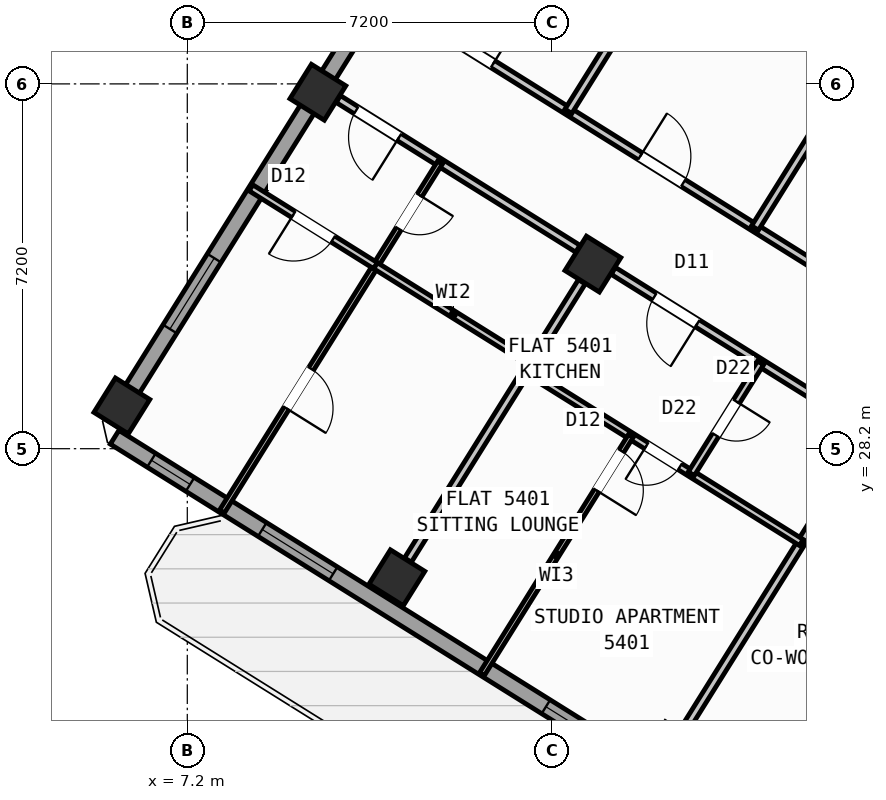
"""IFC4 building model, lengths in metres.
Left out: names, types, materials, properties, quantities, classifications, styles, units other than length and angle.
Written with IfcOpenShell. Run it as: python <this file> out.ifc"""

import sys

from ifc_helpers import new_model, si_unit, direction, frame, frame_2d, origin, origin_2d, place, context, subcontext, project, spatial, rectangle, hollow_rectangle, extrude, source, transform, mapped, element, fill, save


model = new_model("IFC4")
c1 = context("Model", 3, precision=1e-05, world=origin(), true_north=direction((0.0, 1.0)))
c2 = subcontext(c1, "Body", "Model", "MODEL_VIEW")
j1 = project(units=[si_unit("LENGTHUNIT", "METRE"), si_unit("PLANEANGLEUNIT", "RADIAN")], contexts=[c1])
p1 = place(None, origin())
s1 = spatial("IfcSite", under=j1, at=p1, CompositionType="ELEMENT")
p2 = place(p1, origin())
s2 = spatial("IfcBuilding", under=s1, at=p2, CompositionType="ELEMENT")
p3 = place(p2, frame((0.0, 0.0, 214.8)))
s3 = spatial("IfcBuildingStorey", under=s2, at=p3, CompositionType="ELEMENT", Elevation=214.8)
m1 = source(origin(), c2, "Body", "SweptSolid", [
    extrude(hollow_rectangle(XDim=0.8, YDim=0.8, WallThickness=0.032, at=origin_2d()), origin(), (0.0, 0.0, 1.0), 3.6),
])
for number, where, z_axis, x_axis in (
    (1, (15.205, 31.844, 0.0), (0.0, 0.0, 1.0), (-0.848, 0.53, 0.0)),
    (2, (11.336, 25.653, 0.0), (0.0, 0.0, 1.0), (-0.848, 0.53, 0.0)),
    (3, (9.777, 35.235, 0.0), (0.0, 0.0, 1.0), (-0.848, 0.53, 0.0)),
    (4, (5.909, 29.044, 0.0), (0.0, 0.0, 1.0), (-0.848, 0.53, 0.0)),
):
    element("IfcColumn", number, at=place(p3, frame(where, z_axis=z_axis, x_axis=x_axis)), inside=s3, PredefinedType="COLUMN", context=c2, shape_type="MappedRepresentation", body=[
        mapped(m1, transform((0.0, 0.0, 0.0), scale=1.0)),
    ])
p4 = place(p3, frame((31.76, 12.183, 0.0), z_axis=(0.0, 0.0, 1.0), x_axis=(-0.848047074256, 0.529920899612, 0.0)))
e5 = element("IfcWall", 5, at=p4, inside=s3, PredefinedType="STANDARD", context=c2, shape_type="SweptSolid", body=[
    extrude(rectangle(XDim=30.652, YDim=0.32, at=frame_2d((15.326, 0.0))), origin(), (0.0, 0.0, 1.0), 3.35),
])
p5 = place(p4, frame((15.166, 0.0, 0.0)))
e6 = element("IfcOpeningElement", 6, at=p5, cuts=e5, PredefinedType="OPENING", context=c2, shape_type="SweptSolid", body=[
    extrude(rectangle(XDim=1.2, YDim=2.15, at=frame_2d((0.6, 1.075))), frame((0.0, 0.17, 0.0), z_axis=(0.0, -1.0, 0.0), x_axis=(1.0, 0.0, 0.0)), (0.0, 0.0, 1.0), 0.34),
])
p6 = place(p4, frame((2.24, 0.0, 0.9)))
e7 = element("IfcOpeningElement", 7, at=p6, cuts=e5, PredefinedType="OPENING", context=c2, shape_type="SweptSolid", body=[
    extrude(rectangle(XDim=1.65, YDim=1.45, at=frame_2d((0.825, 0.725))), frame((0.0, 0.17, 0.0), z_axis=(0.0, -1.0, 0.0), x_axis=(1.0, 0.0, 0.0)), (0.0, 0.0, 1.0), 0.34),
])
p7 = place(p4, frame((7.469, 0.0, 0.9)))
e8 = element("IfcOpeningElement", 8, at=p7, cuts=e5, PredefinedType="OPENING", context=c2, shape_type="SweptSolid", body=[
    extrude(rectangle(XDim=1.65, YDim=1.45, at=frame_2d((0.825, 0.725))), frame((0.0, 0.17, 0.0), z_axis=(0.0, -1.0, 0.0), x_axis=(1.0, 0.0, 0.0)), (0.0, 0.0, 1.0), 0.34),
])
p8 = place(p4, frame((12.623, 0.0, 1.0)))
e9 = element("IfcOpeningElement", 9, at=p8, cuts=e5, PredefinedType="OPENING", context=c2, shape_type="SweptSolid", body=[
    extrude(rectangle(XDim=0.9, YDim=1.25, at=frame_2d((0.45, 0.625))), frame((0.0, 0.17, 0.0), z_axis=(0.0, -1.0, 0.0), x_axis=(1.0, 0.0, 0.0)), (0.0, 0.0, 1.0), 0.34),
])
p9 = place(p4, frame((19.715, 0.0, 1.0)))
e10 = element("IfcOpeningElement", 10, at=p9, cuts=e5, PredefinedType="OPENING", context=c2, shape_type="SweptSolid", body=[
    extrude(rectangle(XDim=0.9, YDim=1.25, at=frame_2d((0.45, 0.625))), frame((0.0, 0.17, 0.0), z_axis=(0.0, -1.0, 0.0), x_axis=(1.0, 0.0, 0.0)), (0.0, 0.0, 1.0), 0.34),
])
p10 = place(p4, frame((25.566, 0.0, 0.9)))
e11 = element("IfcOpeningElement", 11, at=p10, cuts=e5, PredefinedType="OPENING", context=c2, shape_type="SweptSolid", body=[
    extrude(rectangle(XDim=1.65, YDim=1.45, at=frame_2d((0.825, 0.725))), frame((0.0, 0.17, 0.0), z_axis=(0.0, -1.0, 0.0), x_axis=(1.0, 0.0, 0.0)), (0.0, 0.0, 1.0), 0.34),
])
p11 = place(p4, frame((28.896, 0.0, 1.0)))
e12 = element("IfcOpeningElement", 12, at=p11, cuts=e5, PredefinedType="OPENING", context=c2, shape_type="SweptSolid", body=[
    extrude(rectangle(XDim=0.9, YDim=1.25, at=frame_2d((0.45, 0.625))), frame((0.0, 0.17, 0.0), z_axis=(0.0, -1.0, 0.0), x_axis=(1.0, 0.0, 0.0)), (0.0, 0.0, 1.0), 0.34),
])
p12 = place(p3, frame((5.7, 28.71, 0.0), z_axis=(0.0, 0.0, 1.0), x_axis=(0.529923711467, 0.8480453172, 0.0)))
e13 = element("IfcWall", 13, at=p12, inside=s3, PredefinedType="STANDARD", context=c2, shape_type="SweptSolid", body=[
    extrude(rectangle(XDim=21.587, YDim=0.32, at=frame_2d((10.794, 0.0))), origin(), (0.0, 0.0, 1.0), 2.825),
])
p13 = place(p12, frame((2.184, 0.0, 0.9)))
e14 = element("IfcOpeningElement", 14, at=p13, cuts=e13, PredefinedType="OPENING", context=c2, shape_type="SweptSolid", body=[
    extrude(rectangle(XDim=1.65, YDim=1.45, at=frame_2d((0.825, 0.725))), frame((0.0, 0.17, 0.0), z_axis=(0.0, -1.0, 0.0), x_axis=(1.0, 0.0, 0.0)), (0.0, 0.0, 1.0), 0.34),
])
p14 = place(p12, frame((11.709, 0.0, 0.9)))
e15 = element("IfcOpeningElement", 15, at=p14, cuts=e13, PredefinedType="OPENING", context=c2, shape_type="SweptSolid", body=[
    extrude(rectangle(XDim=1.35, YDim=1.45, at=frame_2d((0.675, 0.725))), frame((0.0, 0.17, 0.0), z_axis=(0.0, -1.0, 0.0), x_axis=(1.0, 0.0, 0.0)), (0.0, 0.0, 1.0), 0.34),
])
p15 = place(p12, frame((17.181, 0.0, 0.95)))
e16 = element("IfcOpeningElement", 16, at=p15, cuts=e13, PredefinedType="OPENING", context=c2, shape_type="SweptSolid", body=[
    extrude(rectangle(XDim=1.95, YDim=1.35, at=frame_2d((0.975, 0.675))), frame((0.0, 0.17, 0.0), z_axis=(0.0, -1.0, 0.0), x_axis=(1.0, 0.0, 0.0)), (0.0, 0.0, 1.0), 0.34),
])
p16 = place(p3, frame((17.424, 47.083, 0.0), z_axis=(0.0, 0.0, 1.0), x_axis=(0.848049927979, -0.529916332693, 0.0)))
e17 = element("IfcWall", 17, at=p16, inside=s3, PredefinedType="STANDARD", context=c2, shape_type="SweptSolid", body=[
    extrude(rectangle(XDim=29.223, YDim=0.32, at=frame_2d((14.612, 0.0))), origin(), (0.0, 0.0, 1.0), 3.35),
])
p17 = place(p16, frame((2.526, 0.0, 0.0)))
e18 = element("IfcOpeningElement", 18, at=p17, cuts=e17, PredefinedType="OPENING", context=c2, shape_type="SweptSolid", body=[
    extrude(rectangle(XDim=1.05, YDim=2.15, at=frame_2d((0.525, 1.075))), frame((0.0, 0.17, 0.0), z_axis=(0.0, -1.0, 0.0), x_axis=(1.0, 0.0, 0.0)), (0.0, 0.0, 1.0), 0.34),
])
p18 = place(p16, frame((0.653, 0.0, 0.9)))
e19 = element("IfcOpeningElement", 19, at=p18, cuts=e17, PredefinedType="OPENING", context=c2, shape_type="SweptSolid", body=[
    extrude(rectangle(XDim=1.35, YDim=1.45, at=frame_2d((0.675, 0.725))), frame((0.0, 0.17, 0.0), z_axis=(0.0, -1.0, 0.0), x_axis=(1.0, 0.0, 0.0)), (0.0, 0.0, 1.0), 0.34),
])
p19 = place(p16, frame((6.897, 0.0, 1.0)))
e20 = element("IfcOpeningElement", 20, at=p19, cuts=e17, PredefinedType="OPENING", context=c2, shape_type="SweptSolid", body=[
    extrude(rectangle(XDim=0.9, YDim=1.25, at=frame_2d((0.45, 0.625))), frame((0.0, 0.17, 0.0), z_axis=(0.0, -1.0, 0.0), x_axis=(1.0, 0.0, 0.0)), (0.0, 0.0, 1.0), 0.34),
])
p20 = place(p16, frame((9.602, 0.0, 0.95)))
e21 = element("IfcOpeningElement", 21, at=p20, cuts=e17, PredefinedType="OPENING", context=c2, shape_type="SweptSolid", body=[
    extrude(rectangle(XDim=1.95, YDim=1.35, at=frame_2d((0.975, 0.675))), frame((0.0, 0.17, 0.0), z_axis=(0.0, -1.0, 0.0), x_axis=(1.0, 0.0, 0.0)), (0.0, 0.0, 1.0), 0.34),
])
p21 = place(p16, frame((14.096, 0.0, 1.0)))
e22 = element("IfcOpeningElement", 22, at=p21, cuts=e17, PredefinedType="OPENING", context=c2, shape_type="SweptSolid", body=[
    extrude(rectangle(XDim=0.9, YDim=1.25, at=frame_2d((0.45, 0.625))), frame((0.0, 0.17, 0.0), z_axis=(0.0, -1.0, 0.0), x_axis=(1.0, 0.0, 0.0)), (0.0, 0.0, 1.0), 0.34),
])
p22 = place(p16, frame((17.254, 0.0, 1.0)))
e23 = element("IfcOpeningElement", 23, at=p22, cuts=e17, PredefinedType="OPENING", context=c2, shape_type="SweptSolid", body=[
    extrude(rectangle(XDim=0.9, YDim=1.25, at=frame_2d((0.45, 0.625))), frame((0.0, 0.17, 0.0), z_axis=(0.0, -1.0, 0.0), x_axis=(1.0, 0.0, 0.0)), (0.0, 0.0, 1.0), 0.34),
])
p23 = place(p16, frame((21.139, 0.0, 0.9)))
e24 = element("IfcOpeningElement", 24, at=p23, cuts=e17, PredefinedType="OPENING", context=c2, shape_type="SweptSolid", body=[
    extrude(rectangle(XDim=1.35, YDim=1.45, at=frame_2d((0.675, 0.725))), frame((0.0, 0.17, 0.0), z_axis=(0.0, -1.0, 0.0), x_axis=(1.0, 0.0, 0.0)), (0.0, 0.0, 1.0), 0.34),
])
p24 = place(p16, frame((25.778, 0.0, 0.9)))
e25 = element("IfcOpeningElement", 25, at=p24, cuts=e17, PredefinedType="OPENING", context=c2, shape_type="SweptSolid", body=[
    extrude(rectangle(XDim=1.35, YDim=1.45, at=frame_2d((0.675, 0.725))), frame((0.0, 0.17, 0.0), z_axis=(0.0, -1.0, 0.0), x_axis=(1.0, 0.0, 0.0)), (0.0, 0.0, 1.0), 0.34),
])
p25 = place(p3, frame((25.065, 28.394, 0.0), z_axis=(0.0, 0.0, 1.0), x_axis=(-0.848048310262, 0.529918921593, 0.0)))
e26 = element("IfcWall", 26, at=p25, inside=s3, PredefinedType="PARTITIONING", context=c2, shape_type="SweptSolid", body=[
    extrude(rectangle(XDim=16.73, YDim=0.16, at=frame_2d((8.365, 0.0))), origin(), (0.0, 0.0, 1.0), 3.34),
])
p26 = place(p25, frame((1.338, 0.0, 0.0)))
e27 = element("IfcOpeningElement", 27, at=p26, cuts=e26, PredefinedType="OPENING", context=c2, shape_type="SweptSolid", body=[
    extrude(rectangle(XDim=1.0, YDim=2.1, at=frame_2d((0.5, 1.05))), frame((0.0, 0.09, 0.0), z_axis=(0.0, -1.0, 0.0), x_axis=(1.0, 0.0, 0.0)), (0.0, 0.0, 1.0), 0.18),
])
p27 = place(p25, frame((5.265, 0.0, 0.0)))
e28 = element("IfcOpeningElement", 28, at=p27, cuts=e26, PredefinedType="OPENING", context=c2, shape_type="SweptSolid", body=[
    extrude(rectangle(XDim=1.0, YDim=2.1, at=frame_2d((0.5, 1.05))), frame((0.0, 0.09, 0.0), z_axis=(0.0, -1.0, 0.0), x_axis=(1.0, 0.0, 0.0)), (0.0, 0.0, 1.0), 0.18),
])
p28 = place(p25, frame((9.526, 0.0, 0.0)))
e29 = element("IfcOpeningElement", 29, at=p28, cuts=e26, PredefinedType="OPENING", context=c2, shape_type="SweptSolid", body=[
    extrude(rectangle(XDim=1.0, YDim=2.1, at=frame_2d((0.5, 1.05))), frame((0.0, 0.09, 0.0), z_axis=(0.0, -1.0, 0.0), x_axis=(1.0, 0.0, 0.0)), (0.0, 0.0, 1.0), 0.18),
])
p29 = place(p25, frame((13.954, 0.0, 0.0)))
e30 = element("IfcOpeningElement", 30, at=p29, cuts=e26, PredefinedType="OPENING", context=c2, shape_type="SweptSolid", body=[
    extrude(rectangle(XDim=1.0, YDim=2.1, at=frame_2d((0.5, 1.05))), frame((0.0, 0.09, 0.0), z_axis=(0.0, -1.0, 0.0), x_axis=(1.0, 0.0, 0.0)), (0.0, 0.0, 1.0), 0.18),
])
p30 = place(p3, frame((20.336, 28.755, 0.0), z_axis=(0.0, 0.0, 1.0), x_axis=(-0.848049955116, 0.529916289265, 0.0)))
e31 = element("IfcWall", 31, at=p30, inside=s3, PredefinedType="PARTITIONING", context=c2, shape_type="SweptSolid", body=[
    extrude(rectangle(XDim=5.576, YDim=0.16, at=frame_2d((2.788, 0.0))), origin(), (0.0, 0.0, 1.0), 2.825),
])
p31 = place(p30, frame((3.618, 0.0, 0.0)))
e32 = element("IfcOpeningElement", 32, at=p31, cuts=e31, PredefinedType="OPENING", context=c2, shape_type="SweptSolid", body=[
    extrude(rectangle(XDim=1.0, YDim=2.1, at=frame_2d((0.5, 1.05))), frame((0.0, 0.09, 0.0), z_axis=(0.0, -1.0, 0.0), x_axis=(1.0, 0.0, 0.0)), (0.0, 0.0, 1.0), 0.18),
])
p32 = place(p3, frame((14.908, 32.147, 0.0), z_axis=(0.0, 0.0, 1.0), x_axis=(-0.848049955116, 0.529916289265, 0.0)))
e33 = element("IfcWall", 33, at=p32, inside=s3, PredefinedType="PARTITIONING", context=c2, shape_type="SweptSolid", body=[
    extrude(rectangle(XDim=5.576, YDim=0.16, at=frame_2d((2.788, 0.0))), origin(), (0.0, 0.0, 1.0), 2.825),
])
p33 = place(p32, frame((4.158, 0.0, 0.0)))
e34 = element("IfcOpeningElement", 34, at=p33, cuts=e33, PredefinedType="OPENING", context=c2, shape_type="SweptSolid", body=[
    extrude(rectangle(XDim=1.0, YDim=2.1, at=frame_2d((0.5, 1.05))), frame((0.0, 0.09, 0.0), z_axis=(0.0, -1.0, 0.0), x_axis=(1.0, 0.0, 0.0)), (0.0, 0.0, 1.0), 0.18),
])
p34 = place(p3, frame((20.414, 28.103, 0.0), z_axis=(0.0, 0.0, 1.0), x_axis=(-0.529934553702, -0.848038542045, 0.0)))
e35 = element("IfcWall", 35, at=p34, inside=s3, PredefinedType="PARTITIONING", context=c2, shape_type="SweptSolid", body=[
    extrude(rectangle(XDim=6.476, YDim=0.16, at=frame_2d((3.238, 0.0))), origin(), (0.0, 0.0, 1.0), 2.825),
])
p35 = place(p3, frame((14.986, 31.494, 0.0), z_axis=(0.0, 0.0, 1.0), x_axis=(-0.529907440938, -0.848055484057, 0.0)))
e36 = element("IfcWall", 36, at=p35, inside=s3, PredefinedType="PARTITIONING", context=c2, shape_type="SweptSolid", body=[
    extrude(rectangle(XDim=6.476, YDim=0.16, at=frame_2d((3.238, 0.0))), origin(), (0.0, 0.0, 1.0), 2.825),
])
p36 = place(p3, frame((19.318, 26.349, 0.0), z_axis=(0.0, 0.0, 1.0), x_axis=(-0.848039019877, 0.529933789039, 0.0)))
e37 = element("IfcWall", 37, at=p36, inside=s3, PredefinedType="PLUMBINGWALL", context=c2, shape_type="SweptSolid", body=[
    extrude(rectangle(XDim=6.4, YDim=0.14, at=frame_2d((3.2, 0.0))), origin(), (0.0, 0.0, 1.0), 3.34),
])
p37 = place(p36, frame((2.824, 0.0, 0.0)))
e38 = element("IfcOpeningElement", 38, at=p37, cuts=e37, PredefinedType="OPENING", context=c2, shape_type="SweptSolid", body=[
    extrude(rectangle(XDim=0.78, YDim=2.05, at=frame_2d((0.39, 1.025))), frame((0.0, 0.08, 0.0), z_axis=(0.0, -1.0, 0.0), x_axis=(1.0, 0.0, 0.0)), (0.0, 0.0, 1.0), 0.16),
])
p38 = place(p3, frame((18.514, 29.894, 0.0), z_axis=(0.0, 0.0, 1.0), x_axis=(-0.529913878929, -0.848051461244, 0.0)))
e39 = element("IfcWall", 39, at=p38, inside=s3, PredefinedType="PLUMBINGWALL", context=c2, shape_type="SweptSolid", body=[
    extrude(rectangle(XDim=2.58, YDim=0.14, at=frame_2d((1.29, 0.0))), origin(), (0.0, 0.0, 1.0), 3.34),
])
p39 = place(p38, frame((0.9, 0.0, 0.0)))
e40 = element("IfcOpeningElement", 40, at=p39, cuts=e39, PredefinedType="OPENING", context=c2, shape_type="SweptSolid", body=[
    extrude(rectangle(XDim=0.78, YDim=2.05, at=frame_2d((0.39, 1.025))), frame((0.0, 0.08, 0.0), z_axis=(0.0, -1.0, 0.0), x_axis=(1.0, 0.0, 0.0)), (0.0, 0.0, 1.0), 0.16),
])
p40 = place(p3, frame((15.953, 28.452, 0.0), z_axis=(0.0, 0.0, 1.0), x_axis=(-0.529919714018, -0.848047815099, 0.0)))
e41 = element("IfcWall", 41, at=p40, inside=s3, PredefinedType="PARTITIONING", context=c2, shape_type="SweptSolid", body=[
    extrude(rectangle(XDim=5.54, YDim=0.11, at=frame_2d((2.77, 0.0))), origin(), (0.0, 0.0, 1.0), 3.34),
])
p41 = place(p40, frame((0.35, 0.0, 0.0)))
e42 = element("IfcOpeningElement", 42, at=p41, cuts=e41, PredefinedType="OPENING", context=c2, shape_type="SweptSolid", body=[
    extrude(rectangle(XDim=0.92, YDim=2.08, at=frame_2d((0.46, 1.04))), frame((0.0, 0.065, 0.0), z_axis=(0.0, -1.0, 0.0), x_axis=(1.0, 0.0, 0.0)), (0.0, 0.0, 1.0), 0.13),
])
p42 = place(p3, frame((12.188, 33.847, 0.0), z_axis=(0.0, 0.0, 1.0), x_axis=(-0.529917860021, -0.848048973604, 0.0)))
e43 = element("IfcWall", 43, at=p42, inside=s3, PredefinedType="PARTITIONING", context=c2, shape_type="SweptSolid", body=[
    extrude(rectangle(XDim=8.12, YDim=0.11, at=frame_2d((4.06, 0.0))), origin(), (0.0, 0.0, 1.0), 3.34),
])
p43 = place(p42, frame((0.76, 0.0, 0.0)))
e44 = element("IfcOpeningElement", 44, at=p43, cuts=e43, PredefinedType="OPENING", context=c2, shape_type="SweptSolid", body=[
    extrude(rectangle(XDim=0.78, YDim=2.05, at=frame_2d((0.39, 1.025))), frame((0.0, 0.065, 0.0), z_axis=(0.0, -1.0, 0.0), x_axis=(1.0, 0.0, 0.0)), (0.0, 0.0, 1.0), 0.13),
])
p44 = place(p42, frame((4.8, 0.0, 0.0)))
e45 = element("IfcOpeningElement", 45, at=p44, cuts=e43, PredefinedType="OPENING", context=c2, shape_type="SweptSolid", body=[
    extrude(rectangle(XDim=0.92, YDim=2.08, at=frame_2d((0.46, 1.04))), frame((0.0, 0.065, 0.0), z_axis=(0.0, -1.0, 0.0), x_axis=(1.0, 0.0, 0.0)), (0.0, 0.0, 1.0), 0.13),
])
p45 = place(p3, frame((10.916, 31.811, 0.0), z_axis=(0.0, 0.0, 1.0), x_axis=(-0.84802195137, 0.529961102341, 0.0)))
e46 = element("IfcWall", 46, at=p45, inside=s3, PredefinedType="PLUMBINGWALL", context=c2, shape_type="SweptSolid", body=[
    extrude(rectangle(XDim=2.9, YDim=0.14, at=frame_2d((1.45, 0.0))), origin(), (0.0, 0.0, 1.0), 3.34),
])
p46 = place(p45, frame((0.99, 0.0, 0.0)))
e47 = element("IfcOpeningElement", 47, at=p46, cuts=e46, PredefinedType="OPENING", context=c2, shape_type="SweptSolid", body=[
    extrude(rectangle(XDim=0.92, YDim=2.08, at=frame_2d((0.46, 1.04))), frame((0.0, 0.08, 0.0), z_axis=(0.0, -1.0, 0.0), x_axis=(1.0, 0.0, 0.0)), (0.0, 0.0, 1.0), 0.16),
])
p47 = place(p3, frame((13.986, 29.893, 0.0), z_axis=(0.0, 0.0, 1.0), x_axis=(-0.848051346257, 0.52991406295, 0.0)))
e48 = element("IfcWall", 48, at=p47, inside=s3, PredefinedType="PLUMBINGWALL", context=c2, shape_type="SweptSolid", body=[
    extrude(rectangle(XDim=3.62, YDim=0.14, at=frame_2d((1.81, 0.0))), origin(), (0.0, 0.0, 1.0), 3.34),
])
for number, where, z_axis, x_axis in (
    (49, (24.578, 42.436, 0.0), (0.0, 0.0, 1.0), (-0.53, -0.848, 0.0)),
    (50, (20.894, 44.738, 0.0), (0.0, 0.0, 1.0), (-0.53, -0.848, 0.0)),
):
    element("IfcWall", number, at=place(p3, frame(where, z_axis=z_axis, x_axis=x_axis)), inside=s3, PredefinedType="PARTITIONING", context=c2, shape_type="SweptSolid", body=[
        extrude(rectangle(XDim=11.65, YDim=0.16, at=frame_2d((5.825, 0.0))), origin(), (0.0, 0.0, 1.0), 2.995),
    ])
m2 = source(origin(), c2, "Body", "SweptSolid", [
    extrude(rectangle(XDim=0.9, YDim=1.25, at=frame_2d((0.45, 0.625))), frame((0.0, 0.03, 0.0), z_axis=(0.0, -1.0, 0.0), x_axis=(1.0, 0.0, 0.0)), (0.0, 0.0, 1.0), 0.06),
])
p48 = place(p9, origin())
e51 = element("IfcWindow", 51, at=p48, inside=s3, PartitioningType="SINGLE_PANEL", PredefinedType="WINDOW", context=c2, shape_type="MappedRepresentation", body=[
    mapped(m2, transform((0.0, 0.0, 0.0), scale=1.0)),
])
fill(e10, e51)
m3 = source(origin(), c2, "Body", "SweptSolid", [
    extrude(rectangle(XDim=1.65, YDim=1.45, at=frame_2d((0.825, 0.725))), frame((0.0, 0.03, 0.0), z_axis=(0.0, -1.0, 0.0), x_axis=(1.0, 0.0, 0.0)), (0.0, 0.0, 1.0), 0.06),
])
p49 = place(p10, origin())
e52 = element("IfcWindow", 52, at=p49, inside=s3, PartitioningType="SINGLE_PANEL", PredefinedType="WINDOW", context=c2, shape_type="MappedRepresentation", body=[
    mapped(m3, transform((0.0, 0.0, 0.0), scale=1.0)),
])
fill(e11, e52)
p50 = place(p11, origin())
e53 = element("IfcWindow", 53, at=p50, inside=s3, PartitioningType="SINGLE_PANEL", PredefinedType="WINDOW", context=c2, shape_type="MappedRepresentation", body=[
    mapped(m2, transform((0.0, 0.0, 0.0), scale=1.0)),
])
fill(e12, e53)
p51 = place(p13, origin())
e54 = element("IfcWindow", 54, at=p51, inside=s3, PartitioningType="SINGLE_PANEL", PredefinedType="WINDOW", context=c2, shape_type="MappedRepresentation", body=[
    mapped(m3, transform((0.0, 0.0, 0.0), scale=1.0)),
])
fill(e14, e54)
m4 = source(origin(), c2, "Body", "SweptSolid", [
    extrude(rectangle(XDim=0.92, YDim=2.08, at=frame_2d((0.46, 1.04))), frame((0.0, 0.025, 0.0), z_axis=(0.0, -1.0, 0.0), x_axis=(1.0, 0.0, 0.0)), (0.0, 0.0, 1.0), 0.05),
])
p52 = place(p41, origin())
e55 = element("IfcDoor", 55, at=p52, inside=s3, OperationType="SINGLE_SWING_RIGHT", PredefinedType="DOOR", context=c2, shape_type="MappedRepresentation", body=[
    mapped(m4, transform((0.0, 0.0, 0.0), scale=1.0)),
])
fill(e42, e55)
m5 = source(origin(), c2, "Body", "SweptSolid", [
    extrude(rectangle(XDim=1.0, YDim=2.1, at=frame_2d((0.5, 1.05))), frame((0.0, 0.025, 0.0), z_axis=(0.0, -1.0, 0.0), x_axis=(1.0, 0.0, 0.0)), (0.0, 0.0, 1.0), 0.05),
])
p53 = place(p31, origin())
e56 = element("IfcDoor", 56, at=p53, inside=s3, OperationType="SINGLE_SWING_LEFT", PredefinedType="DOOR", context=c2, shape_type="MappedRepresentation", body=[
    mapped(m5, transform((0.0, 0.0, 0.0), scale=1.0)),
])
fill(e32, e56)
m6 = source(origin(), c2, "Body", "SweptSolid", [
    extrude(rectangle(XDim=0.78, YDim=2.05, at=frame_2d((0.39, 1.025))), frame((0.0, 0.025, 0.0), z_axis=(0.0, -1.0, 0.0), x_axis=(1.0, 0.0, 0.0)), (0.0, 0.0, 1.0), 0.05),
])
p54 = place(p37, origin())
e57 = element("IfcDoor", 57, at=p54, inside=s3, OperationType="SINGLE_SWING_RIGHT", PredefinedType="DOOR", context=c2, shape_type="MappedRepresentation", body=[
    mapped(m6, transform((0.0, 0.0, 0.0), scale=1.0)),
])
fill(e38, e57)
p55 = place(p39, origin())
e58 = element("IfcDoor", 58, at=p55, inside=s3, OperationType="SINGLE_SWING_LEFT", PredefinedType="DOOR", context=c2, shape_type="MappedRepresentation", body=[
    mapped(m6, transform((0.0, 0.0, 0.0), scale=1.0)),
])
fill(e40, e58)
p56 = place(p33, origin())
e59 = element("IfcDoor", 59, at=p56, inside=s3, OperationType="SINGLE_SWING_LEFT", PredefinedType="DOOR", context=c2, shape_type="MappedRepresentation", body=[
    mapped(m5, transform((0.0, 0.0, 0.0), scale=1.0)),
])
fill(e34, e59)
p57 = place(p46, origin())
e60 = element("IfcDoor", 60, at=p57, inside=s3, OperationType="SINGLE_SWING_RIGHT", PredefinedType="DOOR", context=c2, shape_type="MappedRepresentation", body=[
    mapped(m4, transform((0.0, 0.0, 0.0), scale=1.0)),
])
fill(e47, e60)
p58 = place(p43, origin())
e61 = element("IfcDoor", 61, at=p58, inside=s3, OperationType="SINGLE_SWING_LEFT", PredefinedType="DOOR", context=c2, shape_type="MappedRepresentation", body=[
    mapped(m6, transform((0.0, 0.0, 0.0), scale=1.0)),
])
fill(e44, e61)
p59 = place(p44, origin())
e62 = element("IfcDoor", 62, at=p59, inside=s3, OperationType="SINGLE_SWING_RIGHT", PredefinedType="DOOR", context=c2, shape_type="MappedRepresentation", body=[
    mapped(m4, transform((0.0, 0.0, 0.0), scale=1.0)),
])
fill(e45, e62)
p60 = place(p28, frame((1.0, 0.0, 0.0), z_axis=(0.0, 0.0, 1.0), x_axis=(-1.0, 0.0, 0.0)))
e63 = element("IfcDoor", 63, at=p60, inside=s3, OperationType="SINGLE_SWING_LEFT", PredefinedType="DOOR", context=c2, shape_type="MappedRepresentation", body=[
    mapped(m5, transform((0.0, 0.0, 0.0), scale=1.0)),
])
fill(e29, e63)
p61 = place(p29, frame((1.0, 0.0, 0.0), z_axis=(0.0, 0.0, 1.0), x_axis=(-1.0, 0.0, 0.0)))
e64 = element("IfcDoor", 64, at=p61, inside=s3, OperationType="SINGLE_SWING_RIGHT", PredefinedType="DOOR", context=c2, shape_type="MappedRepresentation", body=[
    mapped(m5, transform((0.0, 0.0, 0.0), scale=1.0)),
])
fill(e30, e64)
save(model, sys.argv[1])
